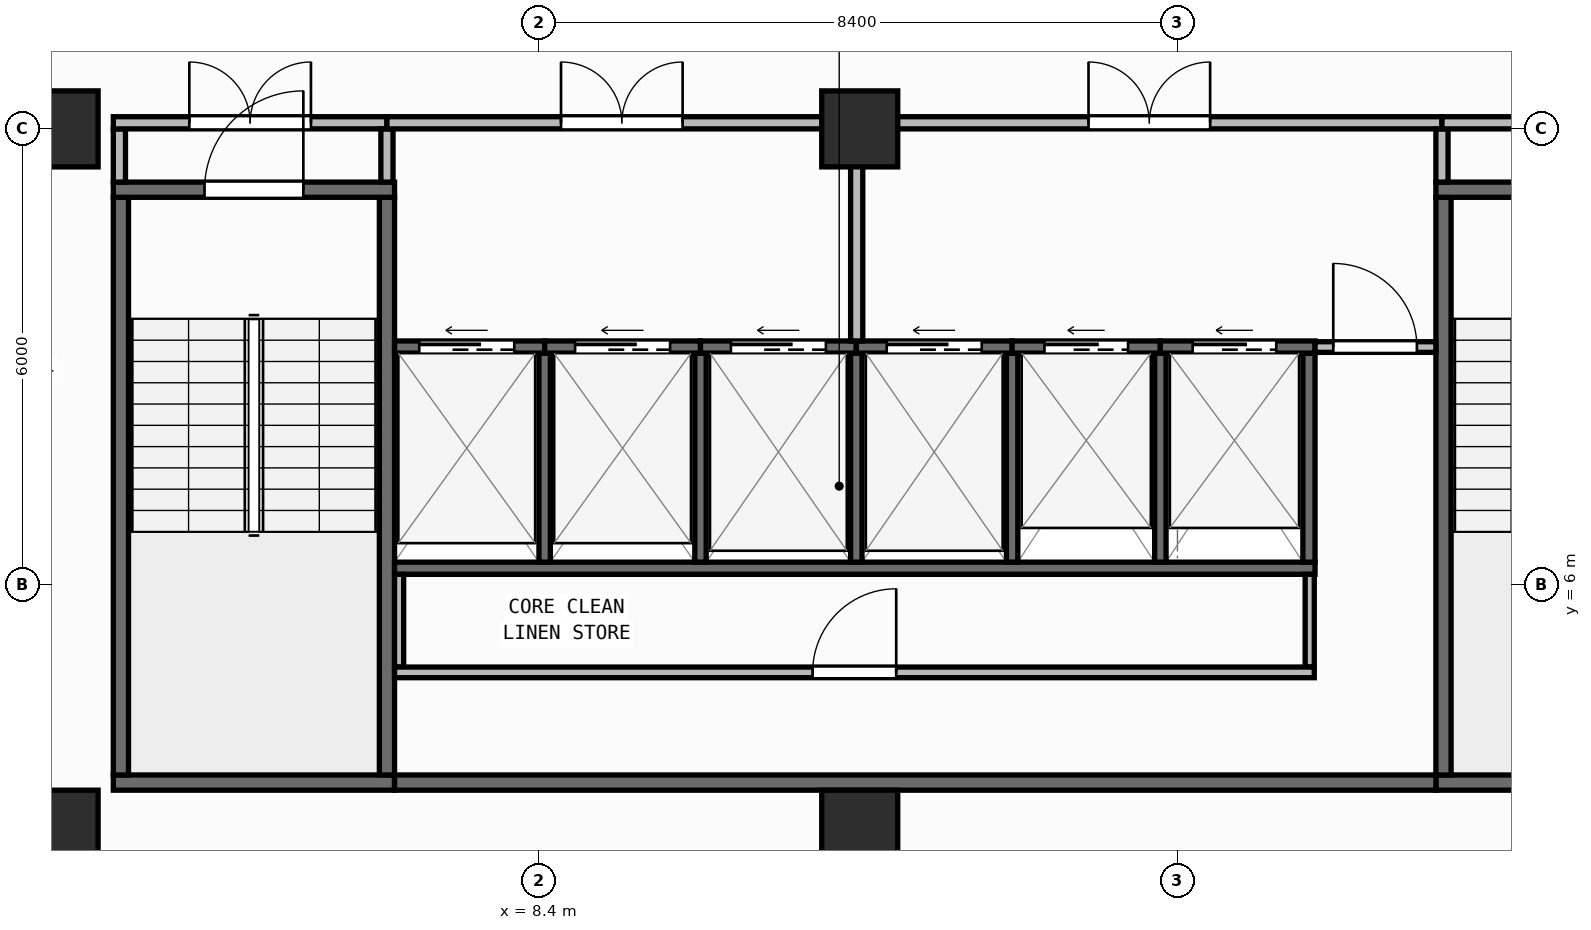
"""IFC4 building model, lengths in metres.
Left out: names, types, materials, properties, quantities, classifications, styles, units other than length and angle.
Written with IfcOpenShell. Run it as: python <this file> out.ifc"""

import sys

from ifc_helpers import new_model, si_unit, direction, frame, frame_2d, origin, origin_2d, place, context, subcontext, project, spatial, rectangle, extrude, element, fill, save


model = new_model("IFC4")
c1 = context("Model", 3, precision=1e-05, world=origin(), true_north=direction((0.0, 1.0)))
c2 = subcontext(c1, "Body", "Model", "MODEL_VIEW")
j1 = project(units=[si_unit("LENGTHUNIT", "METRE"), si_unit("PLANEANGLEUNIT", "RADIAN")], contexts=[c1])
p1 = place(None, origin())
s1 = spatial("IfcSite", under=j1, at=p1, CompositionType="ELEMENT")
p2 = place(p1, origin())
s2 = spatial("IfcBuilding", under=s1, at=p2, CompositionType="ELEMENT")
p3 = place(p2, frame((0.0, 0.0, 180.25)))
s3 = spatial("IfcBuildingStorey", under=s2, at=p3, CompositionType="ELEMENT", Elevation=180.25)
for number, where, z_axis, x_axis in (
    (1, (2.1, 2.8, 0.0), (0.0, 0.0, 1.0), (1.0, 0.0, 0.0)),
    (2, (12.62, 2.8, 0.0), (0.0, 0.0, 1.0), (1.0, 0.0, 0.0)),
    (3, (2.1, 12.0, 0.0), (0.0, 0.0, 1.0), (1.0, 0.0, 0.0)),
    (4, (12.62, 12.0, 0.0), (0.0, 0.0, 1.0), (1.0, 0.0, 0.0)),
):
    element("IfcColumn", number, at=place(p3, frame(where, z_axis=z_axis, x_axis=x_axis)), inside=s3, PredefinedType="COLUMN", context=c2, shape_type="SweptSolid", body=[
        extrude(rectangle(XDim=1.0, YDim=1.0, at=origin_2d()), origin(), (0.0, 0.0, 1.0), 3.95),
    ])
p4 = place(p3, frame((2.66, 0.174, 0.0), z_axis=(0.0, 0.0, 1.0), x_axis=(0.996634028439, 0.081979347142, 0.0)))
e5 = element("IfcWall", 5, at=p4, inside=s3, PredefinedType="STANDARD", context=c2, shape_type="SweptSolid", body=[
    extrude(rectangle(XDim=46.035, YDim=0.26, at=frame_2d((23.018, 0.0))), origin(), (0.0, 0.0, 1.0), 3.71),
])
p5 = place(p4, frame((21.817, 0.0, 0.9)))
e6 = element("IfcOpeningElement", 6, at=p5, cuts=e5, PredefinedType="OPENING", context=c2, shape_type="SweptSolid", body=[
    extrude(rectangle(XDim=2.4, YDim=1.65, at=frame_2d((1.2, 0.825))), frame((0.0, 0.14, 0.0), z_axis=(0.0, -1.0, 0.0), x_axis=(1.0, 0.0, 0.0)), (0.0, 0.0, 1.0), 0.28),
])
p6 = place(p3, frame((2.8, 3.4, 0.0), z_axis=(0.0, 0.0, 1.0), x_axis=(1.0, 0.0, 0.0)))
e7 = element("IfcWall", 7, at=p6, inside=s3, PredefinedType="SHEAR", context=c2, shape_type="SweptSolid", body=[
    extrude(rectangle(XDim=3.7, YDim=0.2, at=frame_2d((1.85, 0.0))), origin(), (0.0, 0.0, 1.0), 3.71),
])
for number, where, z_axis, x_axis in (
    (8, (2.9, 3.5, 0.0), (0.0, 0.0, 1.0), (0.0, 1.0, 0.0)),
    (9, (6.4, 3.5, 0.0), (0.0, 0.0, 1.0), (0.0, 1.0, 0.0)),
):
    element("IfcWall", number, at=place(p3, frame(where, z_axis=z_axis, x_axis=x_axis)), inside=s3, PredefinedType="SHEAR", context=c2, shape_type="SweptSolid", body=[
        extrude(rectangle(XDim=7.6, YDim=0.2, at=frame_2d((3.8, 0.0))), origin(), (0.0, 0.0, 1.0), 3.71),
    ])
p7 = place(p3, frame((2.8, 11.2, 0.0), z_axis=(0.0, 0.0, 1.0), x_axis=(1.0, 0.0, 0.0)))
e10 = element("IfcWall", 10, at=p7, inside=s3, PredefinedType="SHEAR", context=c2, shape_type="SweptSolid", body=[
    extrude(rectangle(XDim=3.7, YDim=0.2, at=frame_2d((1.85, 0.0))), origin(), (0.0, 0.0, 1.0), 3.71),
])
p8 = place(p7, frame((1.2, 0.0, 0.0)))
e11 = element("IfcOpeningElement", 11, at=p8, cuts=e10, PredefinedType="OPENING", context=c2, shape_type="SweptSolid", body=[
    extrude(rectangle(XDim=1.3, YDim=2.15, at=frame_2d((0.65, 1.075))), frame((0.0, 0.11, 0.0), z_axis=(0.0, -1.0, 0.0), x_axis=(1.0, 0.0, 0.0)), (0.0, 0.0, 1.0), 0.22),
])
p9 = place(p3, frame((20.2, 3.4, 0.0), z_axis=(0.0, 0.0, 1.0), x_axis=(1.0, 0.0, 0.0)))
e12 = element("IfcWall", 12, at=p9, inside=s3, PredefinedType="SHEAR", context=c2, shape_type="SweptSolid", body=[
    extrude(rectangle(XDim=3.7, YDim=0.2, at=frame_2d((1.85, 0.0))), origin(), (0.0, 0.0, 1.0), 3.71),
])
p10 = place(p3, frame((20.3, 3.5, 0.0), z_axis=(0.0, 0.0, 1.0), x_axis=(0.0, 1.0, 0.0)))
e13 = element("IfcWall", 13, at=p10, inside=s3, PredefinedType="SHEAR", context=c2, shape_type="SweptSolid", body=[
    extrude(rectangle(XDim=7.6, YDim=0.2, at=frame_2d((3.8, 0.0))), origin(), (0.0, 0.0, 1.0), 3.71),
])
p11 = place(p3, frame((20.2, 11.2, 0.0), z_axis=(0.0, 0.0, 1.0), x_axis=(1.0, 0.0, 0.0)))
e14 = element("IfcWall", 14, at=p11, inside=s3, PredefinedType="SHEAR", context=c2, shape_type="SweptSolid", body=[
    extrude(rectangle(XDim=3.7, YDim=0.2, at=frame_2d((1.85, 0.0))), origin(), (0.0, 0.0, 1.0), 3.71),
])
p12 = place(p11, frame((1.2, 0.0, 0.0)))
e15 = element("IfcOpeningElement", 15, at=p12, cuts=e14, PredefinedType="OPENING", context=c2, shape_type="SweptSolid", body=[
    extrude(rectangle(XDim=1.3, YDim=2.15, at=frame_2d((0.65, 1.075))), frame((0.0, 0.11, 0.0), z_axis=(0.0, -1.0, 0.0), x_axis=(1.0, 0.0, 0.0)), (0.0, 0.0, 1.0), 0.22),
])
p13 = place(p3, frame((6.5, 3.4, 0.0), z_axis=(0.0, 0.0, 1.0), x_axis=(1.0, 0.0, 0.0)))
e16 = element("IfcWall", 16, at=p13, inside=s3, PredefinedType="SHEAR", context=c2, shape_type="SweptSolid", body=[
    extrude(rectangle(XDim=13.7, YDim=0.2, at=frame_2d((6.85, 0.0))), origin(), (0.0, 0.0, 1.0), 3.71),
])
p14 = place(p3, frame((6.5, 6.22, 0.0), z_axis=(0.0, 0.0, 1.0), x_axis=(1.0, 0.0, 0.0)))
e17 = element("IfcWall", 17, at=p14, inside=s3, PredefinedType="SHEAR", context=c2, shape_type="SweptSolid", body=[
    extrude(rectangle(XDim=12.11, YDim=0.16, at=frame_2d((6.055, 0.0))), origin(), (0.0, 0.0, 1.0), 3.71),
])
p15 = place(p3, frame((18.53, 6.3, 0.0), z_axis=(0.0, 0.0, 1.0), x_axis=(0.0, 1.0, 0.0)))
e18 = element("IfcWall", 18, at=p15, inside=s3, PredefinedType="SHEAR", context=c2, shape_type="SweptSolid", body=[
    extrude(rectangle(XDim=2.75, YDim=0.16, at=frame_2d((1.375, 0.0))), origin(), (0.0, 0.0, 1.0), 3.71),
])
for number, where, z_axis, x_axis in (
    (19, (8.475, 6.3, 0.0), (0.0, 0.0, 1.0), (0.0, 1.0, 0.0)),
    (20, (10.525, 6.3, 0.0), (0.0, 0.0, 1.0), (0.0, 1.0, 0.0)),
    (21, (12.575, 6.3, 0.0), (0.0, 0.0, 1.0), (0.0, 1.0, 0.0)),
    (22, (14.625, 6.3, 0.0), (0.0, 0.0, 1.0), (0.0, 1.0, 0.0)),
    (23, (16.575, 6.3, 0.0), (0.0, 0.0, 1.0), (0.0, 1.0, 0.0)),
):
    element("IfcWall", number, at=place(p3, frame(where, z_axis=z_axis, x_axis=x_axis)), inside=s3, PredefinedType="SHEAR", context=c2, shape_type="SweptSolid", body=[
        extrude(rectangle(XDim=2.75, YDim=0.15, at=frame_2d((1.375, 0.0))), origin(), (0.0, 0.0, 1.0), 3.71),
    ])
p16 = place(p3, frame((6.5, 9.13, 0.0), z_axis=(0.0, 0.0, 1.0), x_axis=(1.0, 0.0, 0.0)))
e24 = element("IfcWall", 24, at=p16, inside=s3, PredefinedType="SHEAR", context=c2, shape_type="SweptSolid", body=[
    extrude(rectangle(XDim=1.975, YDim=0.16, at=frame_2d((0.988, 0.0))), origin(), (0.0, 0.0, 1.0), 3.71),
])
p17 = place(p16, frame((0.325, 0.0, 0.0)))
e25 = element("IfcOpeningElement", 25, at=p17, cuts=e24, PredefinedType="OPENING", context=c2, shape_type="SweptSolid", body=[
    extrude(rectangle(XDim=1.25, YDim=2.15, at=frame_2d((0.625, 1.075))), frame((0.0, 0.09, 0.0), z_axis=(0.0, -1.0, 0.0), x_axis=(1.0, 0.0, 0.0)), (0.0, 0.0, 1.0), 0.18),
])
p18 = place(p3, frame((8.475, 9.13, 0.0), z_axis=(0.0, 0.0, 1.0), x_axis=(1.0, 0.0, 0.0)))
e26 = element("IfcWall", 26, at=p18, inside=s3, PredefinedType="SHEAR", context=c2, shape_type="SweptSolid", body=[
    extrude(rectangle(XDim=2.05, YDim=0.16, at=frame_2d((1.025, 0.0))), origin(), (0.0, 0.0, 1.0), 3.71),
])
p19 = place(p18, frame((0.4, 0.0, 0.0)))
e27 = element("IfcOpeningElement", 27, at=p19, cuts=e26, PredefinedType="OPENING", context=c2, shape_type="SweptSolid", body=[
    extrude(rectangle(XDim=1.25, YDim=2.15, at=frame_2d((0.625, 1.075))), frame((0.0, 0.09, 0.0), z_axis=(0.0, -1.0, 0.0), x_axis=(1.0, 0.0, 0.0)), (0.0, 0.0, 1.0), 0.18),
])
p20 = place(p3, frame((10.525, 9.13, 0.0), z_axis=(0.0, 0.0, 1.0), x_axis=(1.0, 0.0, 0.0)))
e28 = element("IfcWall", 28, at=p20, inside=s3, PredefinedType="SHEAR", context=c2, shape_type="SweptSolid", body=[
    extrude(rectangle(XDim=2.05, YDim=0.16, at=frame_2d((1.025, 0.0))), origin(), (0.0, 0.0, 1.0), 3.71),
])
p21 = place(p20, frame((0.4, 0.0, 0.0)))
e29 = element("IfcOpeningElement", 29, at=p21, cuts=e28, PredefinedType="OPENING", context=c2, shape_type="SweptSolid", body=[
    extrude(rectangle(XDim=1.25, YDim=2.15, at=frame_2d((0.625, 1.075))), frame((0.0, 0.09, 0.0), z_axis=(0.0, -1.0, 0.0), x_axis=(1.0, 0.0, 0.0)), (0.0, 0.0, 1.0), 0.18),
])
p22 = place(p3, frame((12.575, 9.13, 0.0), z_axis=(0.0, 0.0, 1.0), x_axis=(1.0, 0.0, 0.0)))
e30 = element("IfcWall", 30, at=p22, inside=s3, PredefinedType="SHEAR", context=c2, shape_type="SweptSolid", body=[
    extrude(rectangle(XDim=2.05, YDim=0.16, at=frame_2d((1.025, 0.0))), origin(), (0.0, 0.0, 1.0), 3.71),
])
p23 = place(p22, frame((0.4, 0.0, 0.0)))
e31 = element("IfcOpeningElement", 31, at=p23, cuts=e30, PredefinedType="OPENING", context=c2, shape_type="SweptSolid", body=[
    extrude(rectangle(XDim=1.25, YDim=2.15, at=frame_2d((0.625, 1.075))), frame((0.0, 0.09, 0.0), z_axis=(0.0, -1.0, 0.0), x_axis=(1.0, 0.0, 0.0)), (0.0, 0.0, 1.0), 0.18),
])
p24 = place(p3, frame((14.625, 9.13, 0.0), z_axis=(0.0, 0.0, 1.0), x_axis=(1.0, 0.0, 0.0)))
e32 = element("IfcWall", 32, at=p24, inside=s3, PredefinedType="SHEAR", context=c2, shape_type="SweptSolid", body=[
    extrude(rectangle(XDim=1.95, YDim=0.16, at=frame_2d((0.975, 0.0))), origin(), (0.0, 0.0, 1.0), 3.71),
])
p25 = place(p24, frame((0.425, 0.0, 0.0)))
e33 = element("IfcOpeningElement", 33, at=p25, cuts=e32, PredefinedType="OPENING", context=c2, shape_type="SweptSolid", body=[
    extrude(rectangle(XDim=1.1, YDim=2.15, at=frame_2d((0.55, 1.075))), frame((0.0, 0.09, 0.0), z_axis=(0.0, -1.0, 0.0), x_axis=(1.0, 0.0, 0.0)), (0.0, 0.0, 1.0), 0.18),
])
p26 = place(p3, frame((16.575, 9.13, 0.0), z_axis=(0.0, 0.0, 1.0), x_axis=(1.0, 0.0, 0.0)))
e34 = element("IfcWall", 34, at=p26, inside=s3, PredefinedType="SHEAR", context=c2, shape_type="SweptSolid", body=[
    extrude(rectangle(XDim=2.035, YDim=0.16, at=frame_2d((1.018, 0.0))), origin(), (0.0, 0.0, 1.0), 3.71),
])
p27 = place(p26, frame((0.425, 0.0, 0.0)))
e35 = element("IfcOpeningElement", 35, at=p27, cuts=e34, PredefinedType="OPENING", context=c2, shape_type="SweptSolid", body=[
    extrude(rectangle(XDim=1.1, YDim=2.15, at=frame_2d((0.55, 1.075))), frame((0.0, 0.09, 0.0), z_axis=(0.0, -1.0, 0.0), x_axis=(1.0, 0.0, 0.0)), (0.0, 0.0, 1.0), 0.18),
])
for number, where, z_axis, x_axis in (
    (36, (6.56, 4.92, 0.0), (0.0, 0.0, 1.0), (0.0, 1.0, 0.0)),
    (37, (18.54, 4.92, 0.0), (0.0, 0.0, 1.0), (0.0, 1.0, 0.0)),
):
    element("IfcWall", number, at=place(p3, frame(where, z_axis=z_axis, x_axis=x_axis)), inside=s3, PredefinedType="PARTITIONING", context=c2, shape_type="SweptSolid", body=[
        extrude(rectangle(XDim=1.22, YDim=0.12, at=frame_2d((0.61, 0.0))), origin(), (0.0, 0.0, 1.0), 3.71),
    ])
p28 = place(p3, frame((6.5, 4.85, 0.0), z_axis=(0.0, 0.0, 1.0), x_axis=(1.0, 0.0, 0.0)))
e38 = element("IfcWall", 38, at=p28, inside=s3, PredefinedType="PARTITIONING", context=c2, shape_type="SweptSolid", body=[
    extrude(rectangle(XDim=12.1, YDim=0.14, at=frame_2d((6.05, 0.0))), origin(), (0.0, 0.0, 1.0), 3.71),
])
p29 = place(p28, frame((5.5, 0.0, 0.0)))
e39 = element("IfcOpeningElement", 39, at=p29, cuts=e38, PredefinedType="OPENING", context=c2, shape_type="SweptSolid", body=[
    extrude(rectangle(XDim=1.1, YDim=2.1, at=frame_2d((0.55, 1.05))), frame((0.0, 0.08, 0.0), z_axis=(0.0, -1.0, 0.0), x_axis=(1.0, 0.0, 0.0)), (0.0, 0.0, 1.0), 0.16),
])
p30 = place(p3, frame((18.61, 9.13, 0.0), z_axis=(0.0, 0.0, 1.0), x_axis=(1.0, 0.0, 0.0)))
e40 = element("IfcWall", 40, at=p30, inside=s3, PredefinedType="PARTITIONING", context=c2, shape_type="SweptSolid", body=[
    extrude(rectangle(XDim=1.59, YDim=0.14, at=frame_2d((0.795, 0.0))), origin(), (0.0, 0.0, 1.0), 3.71),
])
p31 = place(p30, frame((0.24, 0.0, 0.0)))
e41 = element("IfcOpeningElement", 41, at=p31, cuts=e40, PredefinedType="OPENING", context=c2, shape_type="SweptSolid", body=[
    extrude(rectangle(XDim=1.1, YDim=2.1, at=frame_2d((0.55, 1.05))), frame((0.0, 0.08, 0.0), z_axis=(0.0, -1.0, 0.0), x_axis=(1.0, 0.0, 0.0)), (0.0, 0.0, 1.0), 0.16),
])
p32 = place(p3, frame((2.88, 11.3, 0.0), z_axis=(0.0, 0.0, 1.0), x_axis=(0.0, 1.0, 0.0)))
e42 = element("IfcWall", 42, at=p32, inside=s3, PredefinedType="PARTITIONING", context=c2, shape_type="SweptSolid", body=[
    extrude(rectangle(XDim=0.7, YDim=0.16, at=frame_2d((0.35, 0.0))), origin(), (0.0, 0.0, 1.0), 3.71),
])
p33 = place(p3, frame((2.8, 12.08, 0.0), z_axis=(0.0, 0.0, 1.0), x_axis=(1.0, 0.0, 0.0)))
e43 = element("IfcWall", 43, at=p33, inside=s3, PredefinedType="PARTITIONING", context=c2, shape_type="SweptSolid", body=[
    extrude(rectangle(XDim=3.6, YDim=0.16, at=frame_2d((1.8, 0.0))), origin(), (0.0, 0.0, 1.0), 3.152),
])
p34 = place(p33, frame((1.0, 0.0, 0.0)))
e44 = element("IfcOpeningElement", 44, at=p34, cuts=e43, PredefinedType="OPENING", context=c2, shape_type="SweptSolid", body=[
    extrude(rectangle(XDim=1.6, YDim=2.05, at=frame_2d((0.8, 1.025))), frame((0.0, 0.09, 0.0), z_axis=(0.0, -1.0, 0.0), x_axis=(1.0, 0.0, 0.0)), (0.0, 0.0, 1.0), 0.18),
])
p35 = place(p3, frame((6.4, 11.3, 0.0), z_axis=(0.0, 0.0, 1.0), x_axis=(0.0, 1.0, 0.0)))
e45 = element("IfcWall", 45, at=p35, inside=s3, PredefinedType="PARTITIONING", context=c2, shape_type="SweptSolid", body=[
    extrude(rectangle(XDim=0.7, YDim=0.16, at=frame_2d((0.35, 0.0))), origin(), (0.0, 0.0, 1.0), 3.71),
])
p36 = place(p3, frame((6.4, 12.08, 0.0), z_axis=(0.0, 0.0, 1.0), x_axis=(1.0, 0.0, 0.0)))
e46 = element("IfcWall", 46, at=p36, inside=s3, PredefinedType="PARTITIONING", context=c2, shape_type="SweptSolid", body=[
    extrude(rectangle(XDim=6.18, YDim=0.16, at=frame_2d((3.09, 0.0))), origin(), (0.0, 0.0, 1.0), 3.152),
])
p37 = place(p36, frame((2.29, 0.0, 0.0)))
e47 = element("IfcOpeningElement", 47, at=p37, cuts=e46, PredefinedType="OPENING", context=c2, shape_type="SweptSolid", body=[
    extrude(rectangle(XDim=1.6, YDim=2.05, at=frame_2d((0.8, 1.025))), frame((0.0, 0.09, 0.0), z_axis=(0.0, -1.0, 0.0), x_axis=(1.0, 0.0, 0.0)), (0.0, 0.0, 1.0), 0.18),
])
p38 = place(p3, frame((12.58, 9.21, 0.0), z_axis=(0.0, 0.0, 1.0), x_axis=(0.0, 1.0, 0.0)))
e48 = element("IfcWall", 48, at=p38, inside=s3, PredefinedType="PARTITIONING", context=c2, shape_type="SweptSolid", body=[
    extrude(rectangle(XDim=2.79, YDim=0.16, at=frame_2d((1.395, 0.0))), origin(), (0.0, 0.0, 1.0), 3.71),
])
p39 = place(p3, frame((12.58, 12.08, 0.0), z_axis=(0.0, 0.0, 1.0), x_axis=(1.0, 0.0, 0.0)))
e49 = element("IfcWall", 49, at=p39, inside=s3, PredefinedType="PARTITIONING", context=c2, shape_type="SweptSolid", body=[
    extrude(rectangle(XDim=7.7, YDim=0.16, at=frame_2d((3.85, 0.0))), origin(), (0.0, 0.0, 1.0), 3.152),
])
p40 = place(p39, frame((3.05, 0.0, 0.0)))
e50 = element("IfcOpeningElement", 50, at=p40, cuts=e49, PredefinedType="OPENING", context=c2, shape_type="SweptSolid", body=[
    extrude(rectangle(XDim=1.6, YDim=2.05, at=frame_2d((0.8, 1.025))), frame((0.0, 0.09, 0.0), z_axis=(0.0, -1.0, 0.0), x_axis=(1.0, 0.0, 0.0)), (0.0, 0.0, 1.0), 0.18),
])
p41 = place(p3, frame((20.28, 11.3, 0.0), z_axis=(0.0, 0.0, 1.0), x_axis=(0.0, 1.0, 0.0)))
e51 = element("IfcWall", 51, at=p41, inside=s3, PredefinedType="PARTITIONING", context=c2, shape_type="SweptSolid", body=[
    extrude(rectangle(XDim=0.7, YDim=0.16, at=frame_2d((0.35, 0.0))), origin(), (0.0, 0.0, 1.0), 3.71),
])
p42 = place(p3, frame((20.28, 12.08, 0.0), z_axis=(0.0, 0.0, 1.0), x_axis=(1.0, 0.0, 0.0)))
e52 = element("IfcWall", 52, at=p42, inside=s3, PredefinedType="PARTITIONING", context=c2, shape_type="SweptSolid", body=[
    extrude(rectangle(XDim=3.62, YDim=0.16, at=frame_2d((1.81, 0.0))), origin(), (0.0, 0.0, 1.0), 3.152),
])
p43 = place(p42, frame((1.01, 0.0, 0.0)))
e53 = element("IfcOpeningElement", 53, at=p43, cuts=e52, PredefinedType="OPENING", context=c2, shape_type="SweptSolid", body=[
    extrude(rectangle(XDim=1.6, YDim=2.05, at=frame_2d((0.8, 1.025))), frame((0.0, 0.09, 0.0), z_axis=(0.0, -1.0, 0.0), x_axis=(1.0, 0.0, 0.0)), (0.0, 0.0, 1.0), 0.18),
])
p44 = place(p8, origin())
e54 = element("IfcDoor", 54, at=p44, inside=s3, OperationType="SINGLE_SWING_RIGHT", PredefinedType="DOOR", context=c2, shape_type="SweptSolid", body=[
    extrude(rectangle(XDim=1.3, YDim=2.15, at=frame_2d((0.65, 1.075))), frame((0.0, 0.025, 0.0), z_axis=(0.0, -1.0, 0.0), x_axis=(1.0, 0.0, 0.0)), (0.0, 0.0, 1.0), 0.05),
])
fill(e11, e54)
p45 = place(p17, origin())
e55 = element("IfcDoor", 55, at=p45, inside=s3, OperationType="SLIDING_TO_LEFT", PredefinedType="DOOR", context=c2, shape_type="SweptSolid", body=[
    extrude(rectangle(XDim=1.25, YDim=2.15, at=frame_2d((0.625, 1.075))), frame((0.0, 0.025, 0.0), z_axis=(0.0, -1.0, 0.0), x_axis=(1.0, 0.0, 0.0)), (0.0, 0.0, 1.0), 0.05),
])
fill(e25, e55)
p46 = place(p19, origin())
e56 = element("IfcDoor", 56, at=p46, inside=s3, OperationType="SLIDING_TO_LEFT", PredefinedType="DOOR", context=c2, shape_type="SweptSolid", body=[
    extrude(rectangle(XDim=1.25, YDim=2.15, at=frame_2d((0.625, 1.075))), frame((0.0, 0.025, 0.0), z_axis=(0.0, -1.0, 0.0), x_axis=(1.0, 0.0, 0.0)), (0.0, 0.0, 1.0), 0.05),
])
fill(e27, e56)
p47 = place(p21, origin())
e57 = element("IfcDoor", 57, at=p47, inside=s3, OperationType="SLIDING_TO_LEFT", PredefinedType="DOOR", context=c2, shape_type="SweptSolid", body=[
    extrude(rectangle(XDim=1.25, YDim=2.15, at=frame_2d((0.625, 1.075))), frame((0.0, 0.025, 0.0), z_axis=(0.0, -1.0, 0.0), x_axis=(1.0, 0.0, 0.0)), (0.0, 0.0, 1.0), 0.05),
])
fill(e29, e57)
p48 = place(p23, origin())
e58 = element("IfcDoor", 58, at=p48, inside=s3, OperationType="SLIDING_TO_LEFT", PredefinedType="DOOR", context=c2, shape_type="SweptSolid", body=[
    extrude(rectangle(XDim=1.25, YDim=2.15, at=frame_2d((0.625, 1.075))), frame((0.0, 0.025, 0.0), z_axis=(0.0, -1.0, 0.0), x_axis=(1.0, 0.0, 0.0)), (0.0, 0.0, 1.0), 0.05),
])
fill(e31, e58)
p49 = place(p25, origin())
e59 = element("IfcDoor", 59, at=p49, inside=s3, OperationType="SLIDING_TO_LEFT", PredefinedType="DOOR", context=c2, shape_type="SweptSolid", body=[
    extrude(rectangle(XDim=1.1, YDim=2.15, at=frame_2d((0.55, 1.075))), frame((0.0, 0.025, 0.0), z_axis=(0.0, -1.0, 0.0), x_axis=(1.0, 0.0, 0.0)), (0.0, 0.0, 1.0), 0.05),
])
fill(e33, e59)
p50 = place(p27, origin())
e60 = element("IfcDoor", 60, at=p50, inside=s3, OperationType="SLIDING_TO_LEFT", PredefinedType="DOOR", context=c2, shape_type="SweptSolid", body=[
    extrude(rectangle(XDim=1.1, YDim=2.15, at=frame_2d((0.55, 1.075))), frame((0.0, 0.025, 0.0), z_axis=(0.0, -1.0, 0.0), x_axis=(1.0, 0.0, 0.0)), (0.0, 0.0, 1.0), 0.05),
])
fill(e35, e60)
p51 = place(p29, origin())
e61 = element("IfcDoor", 61, at=p51, inside=s3, OperationType="SINGLE_SWING_RIGHT", PredefinedType="DOOR", context=c2, shape_type="SweptSolid", body=[
    extrude(rectangle(XDim=1.1, YDim=2.1, at=frame_2d((0.55, 1.05))), frame((0.0, 0.025, 0.0), z_axis=(0.0, -1.0, 0.0), x_axis=(1.0, 0.0, 0.0)), (0.0, 0.0, 1.0), 0.05),
])
fill(e39, e61)
p52 = place(p31, origin())
e62 = element("IfcDoor", 62, at=p52, inside=s3, OperationType="SINGLE_SWING_LEFT", PredefinedType="DOOR", context=c2, shape_type="SweptSolid", body=[
    extrude(rectangle(XDim=1.1, YDim=2.1, at=frame_2d((0.55, 1.05))), frame((0.0, 0.025, 0.0), z_axis=(0.0, -1.0, 0.0), x_axis=(1.0, 0.0, 0.0)), (0.0, 0.0, 1.0), 0.05),
])
fill(e41, e62)
p53 = place(p34, origin())
e63 = element("IfcDoor", 63, at=p53, inside=s3, OperationType="DOUBLE_DOOR_SINGLE_SWING", PredefinedType="DOOR", context=c2, shape_type="SweptSolid", body=[
    extrude(rectangle(XDim=1.6, YDim=2.05, at=frame_2d((0.8, 1.025))), frame((0.0, 0.025, 0.0), z_axis=(0.0, -1.0, 0.0), x_axis=(1.0, 0.0, 0.0)), (0.0, 0.0, 1.0), 0.05),
])
fill(e44, e63)
p54 = place(p37, origin())
e64 = element("IfcDoor", 64, at=p54, inside=s3, OperationType="DOUBLE_DOOR_SINGLE_SWING", PredefinedType="DOOR", context=c2, shape_type="SweptSolid", body=[
    extrude(rectangle(XDim=1.6, YDim=2.05, at=frame_2d((0.8, 1.025))), frame((0.0, 0.025, 0.0), z_axis=(0.0, -1.0, 0.0), x_axis=(1.0, 0.0, 0.0)), (0.0, 0.0, 1.0), 0.05),
])
fill(e47, e64)
p55 = place(p40, origin())
e65 = element("IfcDoor", 65, at=p55, inside=s3, OperationType="DOUBLE_DOOR_SINGLE_SWING", PredefinedType="DOOR", context=c2, shape_type="SweptSolid", body=[
    extrude(rectangle(XDim=1.6, YDim=2.05, at=frame_2d((0.8, 1.025))), frame((0.0, 0.025, 0.0), z_axis=(0.0, -1.0, 0.0), x_axis=(1.0, 0.0, 0.0)), (0.0, 0.0, 1.0), 0.05),
])
fill(e50, e65)
save(model, sys.argv[1])
